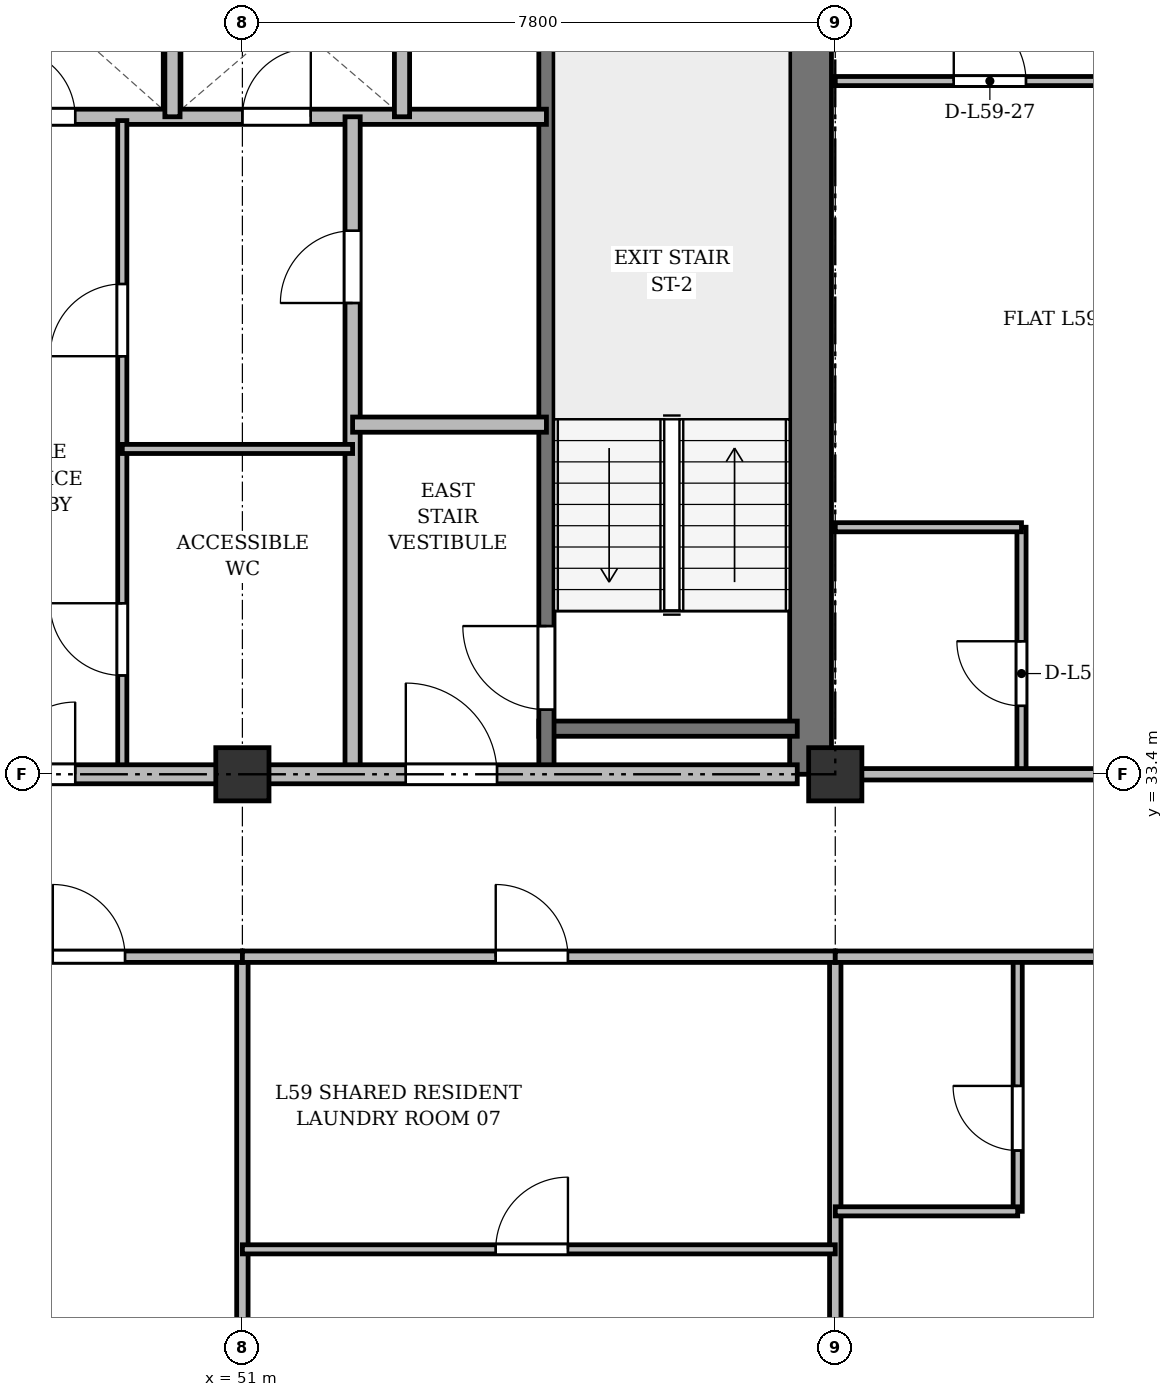
"""IFC4 building model, lengths in metres.
Left out: names, types, materials, properties, quantities, classifications, styles, units other than length and angle.
Written with IfcOpenShell. Run it as: python <this file> out.ifc"""

import sys

from ifc_helpers import new_model, si_unit, direction, frame, frame_2d, origin, origin_2d, place, context, subcontext, project, spatial, rectangle, extrude, source, transform, mapped, element, fill, save


model = new_model("IFC4")
c1 = context("Model", 3, precision=1e-05, world=origin(), true_north=direction((0.0, 1.0)))
c2 = subcontext(c1, "Body", "Model", "MODEL_VIEW")
j1 = project(units=[si_unit("LENGTHUNIT", "METRE"), si_unit("PLANEANGLEUNIT", "RADIAN")], contexts=[c1])
p1 = place(None, origin())
s1 = spatial("IfcSite", under=j1, at=p1, CompositionType="ELEMENT")
p2 = place(p1, origin())
s2 = spatial("IfcBuilding", under=s1, at=p2, CompositionType="ELEMENT")
p3 = place(p2, frame((0.0, 0.0, 226.5)))
s3 = spatial("IfcBuildingStorey", under=s2, at=p3, CompositionType="ELEMENT", Elevation=226.5)
m1 = source(origin(), c2, "Body", "SweptSolid", [
    extrude(rectangle(XDim=0.7, YDim=0.7, at=origin_2d()), origin(), (0.0, 0.0, 1.0), 3.6),
])
for number, where, z_axis, x_axis in (
    (1, (51.0, 33.4, 0.0), (0.0, 0.0, 1.0), (1.0, 0.0, 0.0)),
    (2, (58.8, 33.4, 0.0), (0.0, 0.0, 1.0), (1.0, 0.0, 0.0)),
):
    element("IfcColumn", number, at=place(p3, frame(where, z_axis=z_axis, x_axis=x_axis)), inside=s3, PredefinedType="COLUMN", context=c2, shape_type="MappedRepresentation", body=[
        mapped(m1, transform((0.0, 0.0, 0.0), x_axis=(1.0, 0.0, 0.0), y_axis=(0.0, 1.0, 0.0), z_axis=(0.0, 0.0, 1.0), scale=1.0)),
    ])
p4 = place(p3, frame((58.475, 33.4, 0.0), z_axis=(0.0, 0.0, 1.0), x_axis=(0.0, 1.0, 0.0)))
e3 = element("IfcWall", 3, at=p4, inside=s3, PredefinedType="SHEAR", context=c2, shape_type="SweptSolid", body=[
    extrude(rectangle(XDim=11.55, YDim=0.55, at=frame_2d((5.775, 0.0))), origin(), (0.0, 0.0, 1.0), 3.36),
])
p5 = place(p3, frame((54.9, 34.0, 0.0), z_axis=(0.0, 0.0, 1.0), x_axis=(1.0, 0.0, 0.0)))
e4 = element("IfcWall", 4, at=p5, inside=s3, PredefinedType="SHEAR", context=c2, shape_type="SweptSolid", body=[
    extrude(rectangle(XDim=3.4, YDim=0.2, at=frame_2d((1.7, 0.0))), origin(), (0.0, 0.0, 1.0), 3.36),
])
p6 = place(p3, frame((55.0, 33.4, 0.0), z_axis=(0.0, 0.0, 1.0), x_axis=(0.0, 1.0, 0.0)))
e5 = element("IfcWall", 5, at=p6, inside=s3, PredefinedType="SHEAR", context=c2, shape_type="SweptSolid", body=[
    extrude(rectangle(XDim=11.1, YDim=0.2, at=frame_2d((5.55, 0.0))), origin(), (0.0, 0.0, 1.0), 3.36),
])
p7 = place(p6, frame((0.85, 0.0, 0.0)))
e6 = element("IfcOpeningElement", 6, at=p7, cuts=e5, PredefinedType="OPENING", context=c2, shape_type="SweptSolid", body=[
    extrude(rectangle(XDim=1.1, YDim=2.15, at=frame_2d((0.55, 1.075))), frame((0.0, 0.11, 0.0), z_axis=(0.0, -1.0, 0.0), x_axis=(1.0, 0.0, 0.0)), (0.0, 0.0, 1.0), 0.22),
])
p8 = place(p3, frame((47.15, 42.05, 0.0), z_axis=(0.0, 0.0, 1.0), x_axis=(1.0, 0.0, 0.0)))
e7 = element("IfcWall", 7, at=p8, inside=s3, PredefinedType="SOLIDWALL", context=c2, shape_type="SweptSolid", body=[
    extrude(rectangle(XDim=7.85, YDim=0.2, at=frame_2d((3.925, 0.0))), origin(), (0.0, 0.0, 1.0), 2.86),
])
p9 = place(p8, frame((0.75, 0.0, 0.0)))
e8 = element("IfcOpeningElement", 8, at=p9, cuts=e7, PredefinedType="OPENING", context=c2, shape_type="SweptSolid", body=[
    extrude(rectangle(XDim=0.9, YDim=2.1, at=frame_2d((0.45, 1.05))), frame((0.0, 0.11, 0.0), z_axis=(0.0, -1.0, 0.0), x_axis=(1.0, 0.0, 0.0)), (0.0, 0.0, 1.0), 0.22),
])
p10 = place(p8, frame((3.85, 0.0, 0.0)))
e9 = element("IfcOpeningElement", 9, at=p10, cuts=e7, PredefinedType="OPENING", context=c2, shape_type="SweptSolid", body=[
    extrude(rectangle(XDim=0.9, YDim=2.1, at=frame_2d((0.45, 1.05))), frame((0.0, 0.11, 0.0), z_axis=(0.0, -1.0, 0.0), x_axis=(1.0, 0.0, 0.0)), (0.0, 0.0, 1.0), 0.22),
])
for number, where, z_axis, x_axis in (
    (10, (50.08, 42.05, 0.0), (0.0, 0.0, 1.0), (0.0, 1.0, 0.0)),
    (11, (53.1, 42.05, 0.0), (0.0, 0.0, 1.0), (0.0, 1.0, 0.0)),
):
    element("IfcWall", number, at=place(p3, frame(where, z_axis=z_axis, x_axis=x_axis)), inside=s3, PredefinedType="SOLIDWALL", context=c2, shape_type="SweptSolid", body=[
        extrude(rectangle(XDim=2.65, YDim=0.2, at=frame_2d((1.325, 0.0))), origin(), (0.0, 0.0, 1.0), 3.36),
    ])
p11 = place(p3, frame((52.45, 33.4, 0.0), z_axis=(0.0, 0.0, 1.0), x_axis=(0.0, 1.0, 0.0)))
e12 = element("IfcWall", 12, at=p11, inside=s3, PredefinedType="PARTITIONING", context=c2, shape_type="SweptSolid", body=[
    extrude(rectangle(XDim=8.65, YDim=0.2, at=frame_2d((4.325, 0.0))), origin(), (0.0, 0.0, 1.0), 2.91),
])
p12 = place(p11, frame((6.2, 0.0, 0.0)))
e13 = element("IfcOpeningElement", 13, at=p12, cuts=e12, PredefinedType="OPENING", context=c2, shape_type="SweptSolid", body=[
    extrude(rectangle(XDim=0.95, YDim=2.15, at=frame_2d((0.475, 1.075))), frame((0.0, 0.11, 0.0), z_axis=(0.0, -1.0, 0.0), x_axis=(1.0, 0.0, 0.0)), (0.0, 0.0, 1.0), 0.22),
])
p13 = place(p3, frame((52.45, 38.0, 0.0), z_axis=(0.0, 0.0, 1.0), x_axis=(1.0, 0.0, 0.0)))
e14 = element("IfcWall", 14, at=p13, inside=s3, PredefinedType="PARTITIONING", context=c2, shape_type="SweptSolid", body=[
    extrude(rectangle(XDim=2.55, YDim=0.2, at=frame_2d((1.275, 0.0))), origin(), (0.0, 0.0, 1.0), 3.36),
])
p14 = place(p3, frame((49.42, 33.4, 0.0), z_axis=(0.0, 0.0, 1.0), x_axis=(0.0, 1.0, 0.0)))
e15 = element("IfcWall", 15, at=p14, inside=s3, PredefinedType="PARTITIONING", context=c2, shape_type="SweptSolid", body=[
    extrude(rectangle(XDim=8.6, YDim=0.12, at=frame_2d((4.3, 0.0))), origin(), (0.0, 0.0, 1.0), 2.91),
])
p15 = place(p14, frame((1.3, 0.0, 0.0)))
e16 = element("IfcOpeningElement", 16, at=p15, cuts=e15, PredefinedType="OPENING", context=c2, shape_type="SweptSolid", body=[
    extrude(rectangle(XDim=0.95, YDim=2.15, at=frame_2d((0.475, 1.075))), frame((0.0, 0.07, 0.0), z_axis=(0.0, -1.0, 0.0), x_axis=(1.0, 0.0, 0.0)), (0.0, 0.0, 1.0), 0.14),
])
p16 = place(p14, frame((5.5, 0.0, 0.0)))
e17 = element("IfcOpeningElement", 17, at=p16, cuts=e15, PredefinedType="OPENING", context=c2, shape_type="SweptSolid", body=[
    extrude(rectangle(XDim=0.95, YDim=2.15, at=frame_2d((0.475, 1.075))), frame((0.0, 0.07, 0.0), z_axis=(0.0, -1.0, 0.0), x_axis=(1.0, 0.0, 0.0)), (0.0, 0.0, 1.0), 0.14),
])
p17 = place(p3, frame((49.42, 37.68, 0.0), z_axis=(0.0, 0.0, 1.0), x_axis=(1.0, 0.0, 0.0)))
e18 = element("IfcWall", 18, at=p17, inside=s3, PredefinedType="PARTITIONING", context=c2, shape_type="SweptSolid", body=[
    extrude(rectangle(XDim=3.03, YDim=0.12, at=frame_2d((1.515, 0.0))), origin(), (0.0, 0.0, 1.0), 2.86),
])
p18 = place(p3, frame((47.15, 33.4, 0.0), z_axis=(0.0, 0.0, 1.0), x_axis=(1.0, 0.0, 0.0)))
e19 = element("IfcWall", 19, at=p18, inside=s3, PredefinedType="PARTITIONING", context=c2, shape_type="SweptSolid", body=[
    extrude(rectangle(XDim=11.15, YDim=0.25, at=frame_2d((5.575, 0.0))), origin(), (0.0, 0.0, 1.0), 2.91),
])
p19 = place(p18, frame((0.7, 0.0, 0.0)))
e20 = element("IfcOpeningElement", 20, at=p19, cuts=e19, PredefinedType="OPENING", context=c2, shape_type="SweptSolid", body=[
    extrude(rectangle(XDim=0.95, YDim=2.15, at=frame_2d((0.475, 1.075))), frame((0.0, 0.135, 0.0), z_axis=(0.0, -1.0, 0.0), x_axis=(1.0, 0.0, 0.0)), (0.0, 0.0, 1.0), 0.27),
])
p20 = place(p18, frame((6.0, 0.0, 0.0)))
e21 = element("IfcOpeningElement", 21, at=p20, cuts=e19, PredefinedType="OPENING", context=c2, shape_type="SweptSolid", body=[
    extrude(rectangle(XDim=1.2, YDim=2.15, at=frame_2d((0.6, 1.075))), frame((0.0, 0.135, 0.0), z_axis=(0.0, -1.0, 0.0), x_axis=(1.0, 0.0, 0.0)), (0.0, 0.0, 1.0), 0.27),
])
p21 = place(p3, frame((61.25, 33.4, 0.0), z_axis=(0.0, 0.0, 1.0), x_axis=(0.0, 1.0, 0.0)))
e22 = element("IfcWall", 22, at=p21, inside=s3, PredefinedType="PARTITIONING", context=c2, shape_type="SweptSolid", body=[
    extrude(rectangle(XDim=3.25, YDim=0.12, at=frame_2d((1.625, 0.0))), origin(), (0.0, 0.0, 1.0), 2.91),
])
p22 = place(p21, frame((0.9, 0.0, 0.0)))
e23 = element("IfcOpeningElement", 23, at=p22, cuts=e22, PredefinedType="OPENING", context=c2, shape_type="SweptSolid", body=[
    extrude(rectangle(XDim=0.85, YDim=2.1, at=frame_2d((0.425, 1.05))), frame((0.0, 0.07, 0.0), z_axis=(0.0, -1.0, 0.0), x_axis=(1.0, 0.0, 0.0)), (0.0, 0.0, 1.0), 0.14),
])
p23 = place(p3, frame((58.8, 36.65, 0.0), z_axis=(0.0, 0.0, 1.0), x_axis=(1.0, 0.0, 0.0)))
e24 = element("IfcWall", 24, at=p23, inside=s3, PredefinedType="PARTITIONING", context=c2, shape_type="SweptSolid", body=[
    extrude(rectangle(XDim=2.45, YDim=0.12, at=frame_2d((1.225, 0.0))), origin(), (0.0, 0.0, 1.0), 2.86),
])
p24 = place(p3, frame((58.8, 42.52, 0.0), z_axis=(0.0, 0.0, 1.0), x_axis=(1.0, 0.0, 0.0)))
e25 = element("IfcWall", 25, at=p24, inside=s3, PredefinedType="PARTITIONING", context=c2, shape_type="SweptSolid", body=[
    extrude(rectangle(XDim=3.675, YDim=0.12, at=frame_2d((1.837, 0.0))), origin(), (0.0, 0.0, 1.0), 2.86),
])
p25 = place(p24, frame((1.559, 0.0, 0.0)))
e26 = element("IfcOpeningElement", 26, at=p25, cuts=e25, PredefinedType="OPENING", context=c2, shape_type="SweptSolid", body=[
    extrude(rectangle(XDim=0.95, YDim=2.15, at=frame_2d((0.475, 1.075))), frame((0.0, 0.07, 0.0), z_axis=(0.0, -1.0, 0.0), x_axis=(1.0, 0.0, 0.0)), (0.0, 0.0, 1.0), 0.14),
])
p26 = place(p3, frame((58.8, 33.4, 0.0), z_axis=(0.0, 0.0, 1.0), x_axis=(1.0, 0.0, 0.0)))
e27 = element("IfcWall", 27, at=p26, inside=s3, PredefinedType="PARTITIONING", context=c2, shape_type="SweptSolid", body=[
    extrude(rectangle(XDim=7.35, YDim=0.15, at=frame_2d((3.675, 0.0))), origin(), (0.0, 0.0, 1.0), 2.91),
])
p27 = place(p26, frame((4.275, 0.0, 0.0)))
e28 = element("IfcOpeningElement", 28, at=p27, cuts=e27, PredefinedType="OPENING", context=c2, shape_type="SweptSolid", body=[
    extrude(rectangle(XDim=0.95, YDim=2.15, at=frame_2d((0.475, 1.075))), frame((0.0, 0.085, 0.0), z_axis=(0.0, -1.0, 0.0), x_axis=(1.0, 0.0, 0.0)), (0.0, 0.0, 1.0), 0.17),
])
for number, where, z_axis, x_axis in (
    (29, (51.0, 3.625, 0.0), (0.0, 0.0, 1.0), (0.0, 1.0, 0.0)),
    (30, (58.8, 3.625, 0.0), (0.0, 0.0, 1.0), (0.0, 1.0, 0.0)),
):
    element("IfcWall", number, at=place(p3, frame(where, z_axis=z_axis, x_axis=x_axis)), inside=s3, PredefinedType="PARTITIONING", context=c2, shape_type="SweptSolid", body=[
        extrude(rectangle(XDim=27.375, YDim=0.15, at=frame_2d((13.688, 0.0))), origin(), (0.0, 0.0, 1.0), 2.86),
    ])
p28 = place(p3, frame((43.8, 31.0, 0.0), z_axis=(0.0, 0.0, 1.0), x_axis=(1.0, 0.0, 0.0)))
e31 = element("IfcWall", 31, at=p28, inside=s3, PredefinedType="PARTITIONING", context=c2, shape_type="SweptSolid", body=[
    extrude(rectangle(XDim=7.2, YDim=0.15, at=frame_2d((3.6, 0.0))), origin(), (0.0, 0.0, 1.0), 2.86),
])
p29 = place(p28, frame((4.706, 0.0, 0.0)))
e32 = element("IfcOpeningElement", 32, at=p29, cuts=e31, PredefinedType="OPENING", context=c2, shape_type="SweptSolid", body=[
    extrude(rectangle(XDim=0.95, YDim=2.15, at=frame_2d((0.475, 1.075))), frame((0.0, 0.085, 0.0), z_axis=(0.0, -1.0, 0.0), x_axis=(1.0, 0.0, 0.0)), (0.0, 0.0, 1.0), 0.17),
])
p30 = place(p3, frame((51.0, 31.0, 0.0), z_axis=(0.0, 0.0, 1.0), x_axis=(1.0, 0.0, 0.0)))
e33 = element("IfcWall", 33, at=p30, inside=s3, PredefinedType="PARTITIONING", context=c2, shape_type="SweptSolid", body=[
    extrude(rectangle(XDim=7.8, YDim=0.15, at=frame_2d((3.9, 0.0))), origin(), (0.0, 0.0, 1.0), 2.86),
])
p31 = place(p30, frame((3.333, 0.0, 0.0)))
e34 = element("IfcOpeningElement", 34, at=p31, cuts=e33, PredefinedType="OPENING", context=c2, shape_type="SweptSolid", body=[
    extrude(rectangle(XDim=0.95, YDim=2.15, at=frame_2d((0.475, 1.075))), frame((0.0, 0.085, 0.0), z_axis=(0.0, -1.0, 0.0), x_axis=(1.0, 0.0, 0.0)), (0.0, 0.0, 1.0), 0.17),
])
p32 = place(p3, frame((51.0, 27.15, 0.0), z_axis=(0.0, 0.0, 1.0), x_axis=(1.0, 0.0, 0.0)))
e35 = element("IfcWall", 35, at=p32, inside=s3, PredefinedType="PARTITIONING", context=c2, shape_type="SweptSolid", body=[
    extrude(rectangle(XDim=7.8, YDim=0.12, at=frame_2d((3.9, 0.0))), origin(), (0.0, 0.0, 1.0), 2.86),
])
p33 = place(p32, frame((3.333, 0.0, 0.0)))
e36 = element("IfcOpeningElement", 36, at=p33, cuts=e35, PredefinedType="OPENING", context=c2, shape_type="SweptSolid", body=[
    extrude(rectangle(XDim=0.95, YDim=2.15, at=frame_2d((0.475, 1.075))), frame((0.0, 0.07, 0.0), z_axis=(0.0, -1.0, 0.0), x_axis=(1.0, 0.0, 0.0)), (0.0, 0.0, 1.0), 0.14),
])
p34 = place(p3, frame((61.2, 27.65, 0.0), z_axis=(0.0, 0.0, 1.0), x_axis=(0.0, 1.0, 0.0)))
e37 = element("IfcWall", 37, at=p34, inside=s3, PredefinedType="PARTITIONING", context=c2, shape_type="SweptSolid", body=[
    extrude(rectangle(XDim=3.35, YDim=0.12, at=frame_2d((1.675, 0.0))), origin(), (0.0, 0.0, 1.0), 3.36),
])
p35 = place(p34, frame((0.8, 0.0, 0.0)))
e38 = element("IfcOpeningElement", 38, at=p35, cuts=e37, PredefinedType="OPENING", context=c2, shape_type="SweptSolid", body=[
    extrude(rectangle(XDim=0.85, YDim=2.1, at=frame_2d((0.425, 1.05))), frame((0.0, 0.07, 0.0), z_axis=(0.0, -1.0, 0.0), x_axis=(1.0, 0.0, 0.0)), (0.0, 0.0, 1.0), 0.14),
])
p36 = place(p3, frame((58.8, 27.65, 0.0), z_axis=(0.0, 0.0, 1.0), x_axis=(1.0, 0.0, 0.0)))
e39 = element("IfcWall", 39, at=p36, inside=s3, PredefinedType="PARTITIONING", context=c2, shape_type="SweptSolid", body=[
    extrude(rectangle(XDim=2.4, YDim=0.12, at=frame_2d((1.2, 0.0))), origin(), (0.0, 0.0, 1.0), 2.86),
])
p37 = place(p3, frame((58.8, 31.0, 0.0), z_axis=(0.0, 0.0, 1.0), x_axis=(1.0, 0.0, 0.0)))
e40 = element("IfcWall", 40, at=p37, inside=s3, PredefinedType="PARTITIONING", context=c2, shape_type="SweptSolid", body=[
    extrude(rectangle(XDim=7.375, YDim=0.15, at=frame_2d((3.688, 0.0))), origin(), (0.0, 0.0, 1.0), 2.86),
])
p38 = place(p37, frame((4.877, 0.0, 0.0)))
e41 = element("IfcOpeningElement", 41, at=p38, cuts=e40, PredefinedType="OPENING", context=c2, shape_type="SweptSolid", body=[
    extrude(rectangle(XDim=0.95, YDim=2.15, at=frame_2d((0.475, 1.075))), frame((0.0, 0.085, 0.0), z_axis=(0.0, -1.0, 0.0), x_axis=(1.0, 0.0, 0.0)), (0.0, 0.0, 1.0), 0.17),
])
m2 = source(origin(), c2, "Body", "SweptSolid", [
    extrude(rectangle(XDim=1.1, YDim=2.15, at=frame_2d((0.55, 1.075))), frame((0.0, 0.025, 0.0), z_axis=(0.0, -1.0, 0.0), x_axis=(1.0, 0.0, 0.0)), (0.0, 0.0, 1.0), 0.05),
])
p39 = place(p7, origin())
e42 = element("IfcDoor", 42, at=p39, inside=s3, OperationType="SINGLE_SWING_RIGHT", PredefinedType="DOOR", context=c2, shape_type="MappedRepresentation", body=[
    mapped(m2, transform((0.0, 0.0, 0.0), x_axis=(1.0, 0.0, 0.0), y_axis=(0.0, 1.0, 0.0), z_axis=(0.0, 0.0, 1.0), scale=1.0)),
])
fill(e6, e42)
m3 = source(origin(), c2, "Body", "SweptSolid", [
    extrude(rectangle(XDim=0.9, YDim=2.1, at=frame_2d((0.45, 1.05))), frame((0.0, 0.025, 0.0), z_axis=(0.0, -1.0, 0.0), x_axis=(1.0, 0.0, 0.0)), (0.0, 0.0, 1.0), 0.05),
])
p40 = place(p9, origin())
e43 = element("IfcDoor", 43, at=p40, inside=s3, OperationType="SINGLE_SWING_LEFT", PredefinedType="DOOR", context=c2, shape_type="MappedRepresentation", body=[
    mapped(m3, transform((0.0, 0.0, 0.0), x_axis=(1.0, 0.0, 0.0), y_axis=(0.0, 1.0, 0.0), z_axis=(0.0, 0.0, 1.0), scale=1.0)),
])
fill(e8, e43)
p41 = place(p10, origin())
e44 = element("IfcDoor", 44, at=p41, inside=s3, OperationType="SINGLE_SWING_RIGHT", PredefinedType="DOOR", context=c2, shape_type="MappedRepresentation", body=[
    mapped(m3, transform((0.0, 0.0, 0.0), x_axis=(1.0, 0.0, 0.0), y_axis=(0.0, 1.0, 0.0), z_axis=(0.0, 0.0, 1.0), scale=1.0)),
])
fill(e9, e44)
m4 = source(origin(), c2, "Body", "SweptSolid", [
    extrude(rectangle(XDim=0.95, YDim=2.15, at=frame_2d((0.475, 1.075))), frame((0.0, 0.025, 0.0), z_axis=(0.0, -1.0, 0.0), x_axis=(1.0, 0.0, 0.0)), (0.0, 0.0, 1.0), 0.05),
])
p42 = place(p12, origin())
e45 = element("IfcDoor", 45, at=p42, inside=s3, OperationType="SINGLE_SWING_LEFT", PredefinedType="DOOR", context=c2, shape_type="MappedRepresentation", body=[
    mapped(m4, transform((0.0, 0.0, 0.0), x_axis=(1.0, 0.0, 0.0), y_axis=(0.0, 1.0, 0.0), z_axis=(0.0, 0.0, 1.0), scale=1.0)),
])
fill(e13, e45)
p43 = place(p15, origin())
e46 = element("IfcDoor", 46, at=p43, inside=s3, OperationType="SINGLE_SWING_RIGHT", PredefinedType="DOOR", context=c2, shape_type="MappedRepresentation", body=[
    mapped(m4, transform((0.0, 0.0, 0.0), x_axis=(1.0, 0.0, 0.0), y_axis=(0.0, 1.0, 0.0), z_axis=(0.0, 0.0, 1.0), scale=1.0)),
])
fill(e16, e46)
p44 = place(p16, origin())
e47 = element("IfcDoor", 47, at=p44, inside=s3, OperationType="SINGLE_SWING_LEFT", PredefinedType="DOOR", context=c2, shape_type="MappedRepresentation", body=[
    mapped(m4, transform((0.0, 0.0, 0.0), x_axis=(1.0, 0.0, 0.0), y_axis=(0.0, 1.0, 0.0), z_axis=(0.0, 0.0, 1.0), scale=1.0)),
])
fill(e17, e47)
p45 = place(p19, origin())
e48 = element("IfcDoor", 48, at=p45, inside=s3, OperationType="SINGLE_SWING_RIGHT", PredefinedType="DOOR", context=c2, shape_type="MappedRepresentation", body=[
    mapped(m4, transform((0.0, 0.0, 0.0), x_axis=(1.0, 0.0, 0.0), y_axis=(0.0, 1.0, 0.0), z_axis=(0.0, 0.0, 1.0), scale=1.0)),
])
fill(e20, e48)
m5 = source(origin(), c2, "Body", "SweptSolid", [
    extrude(rectangle(XDim=1.2, YDim=2.15, at=frame_2d((0.6, 1.075))), frame((0.0, 0.025, 0.0), z_axis=(0.0, -1.0, 0.0), x_axis=(1.0, 0.0, 0.0)), (0.0, 0.0, 1.0), 0.05),
])
p46 = place(p20, origin())
e49 = element("IfcDoor", 49, at=p46, inside=s3, OperationType="SINGLE_SWING_LEFT", PredefinedType="DOOR", context=c2, shape_type="MappedRepresentation", body=[
    mapped(m5, transform((0.0, 0.0, 0.0), x_axis=(1.0, 0.0, 0.0), y_axis=(0.0, 1.0, 0.0), z_axis=(0.0, 0.0, 1.0), scale=1.0)),
])
fill(e21, e49)
m6 = source(origin(), c2, "Body", "SweptSolid", [
    extrude(rectangle(XDim=0.85, YDim=2.1, at=frame_2d((0.425, 1.05))), frame((0.0, 0.025, 0.0), z_axis=(0.0, -1.0, 0.0), x_axis=(1.0, 0.0, 0.0)), (0.0, 0.0, 1.0), 0.05),
])
p47 = place(p22, origin())
e50 = element("IfcDoor", 50, at=p47, inside=s3, OperationType="SINGLE_SWING_RIGHT", PredefinedType="DOOR", context=c2, shape_type="MappedRepresentation", body=[
    mapped(m6, transform((0.0, 0.0, 0.0), x_axis=(1.0, 0.0, 0.0), y_axis=(0.0, 1.0, 0.0), z_axis=(0.0, 0.0, 1.0), scale=1.0)),
])
fill(e23, e50)
p48 = place(p25, origin())
e51 = element("IfcDoor", 51, at=p48, inside=s3, OperationType="SINGLE_SWING_LEFT", PredefinedType="DOOR", context=c2, shape_type="MappedRepresentation", body=[
    mapped(m4, transform((0.0, 0.0, 0.0), x_axis=(1.0, 0.0, 0.0), y_axis=(0.0, 1.0, 0.0), z_axis=(0.0, 0.0, 1.0), scale=1.0)),
])
fill(e26, e51)
p49 = place(p29, origin())
e52 = element("IfcDoor", 52, at=p49, inside=s3, OperationType="SINGLE_SWING_LEFT", PredefinedType="DOOR", context=c2, shape_type="MappedRepresentation", body=[
    mapped(m4, transform((0.0, 0.0, 0.0), x_axis=(1.0, 0.0, 0.0), y_axis=(0.0, 1.0, 0.0), z_axis=(0.0, 0.0, 1.0), scale=1.0)),
])
fill(e32, e52)
p50 = place(p31, origin())
e53 = element("IfcDoor", 53, at=p50, inside=s3, OperationType="SINGLE_SWING_LEFT", PredefinedType="DOOR", context=c2, shape_type="MappedRepresentation", body=[
    mapped(m4, transform((0.0, 0.0, 0.0), x_axis=(1.0, 0.0, 0.0), y_axis=(0.0, 1.0, 0.0), z_axis=(0.0, 0.0, 1.0), scale=1.0)),
])
fill(e34, e53)
p51 = place(p33, origin())
e54 = element("IfcDoor", 54, at=p51, inside=s3, OperationType="SINGLE_SWING_RIGHT", PredefinedType="DOOR", context=c2, shape_type="MappedRepresentation", body=[
    mapped(m4, transform((0.0, 0.0, 0.0), x_axis=(1.0, 0.0, 0.0), y_axis=(0.0, 1.0, 0.0), z_axis=(0.0, 0.0, 1.0), scale=1.0)),
])
fill(e36, e54)
p52 = place(p35, origin())
e55 = element("IfcDoor", 55, at=p52, inside=s3, OperationType="SINGLE_SWING_RIGHT", PredefinedType="DOOR", context=c2, shape_type="MappedRepresentation", body=[
    mapped(m6, transform((0.0, 0.0, 0.0), x_axis=(1.0, 0.0, 0.0), y_axis=(0.0, 1.0, 0.0), z_axis=(0.0, 0.0, 1.0), scale=1.0)),
])
fill(e38, e55)
save(model, sys.argv[1])
